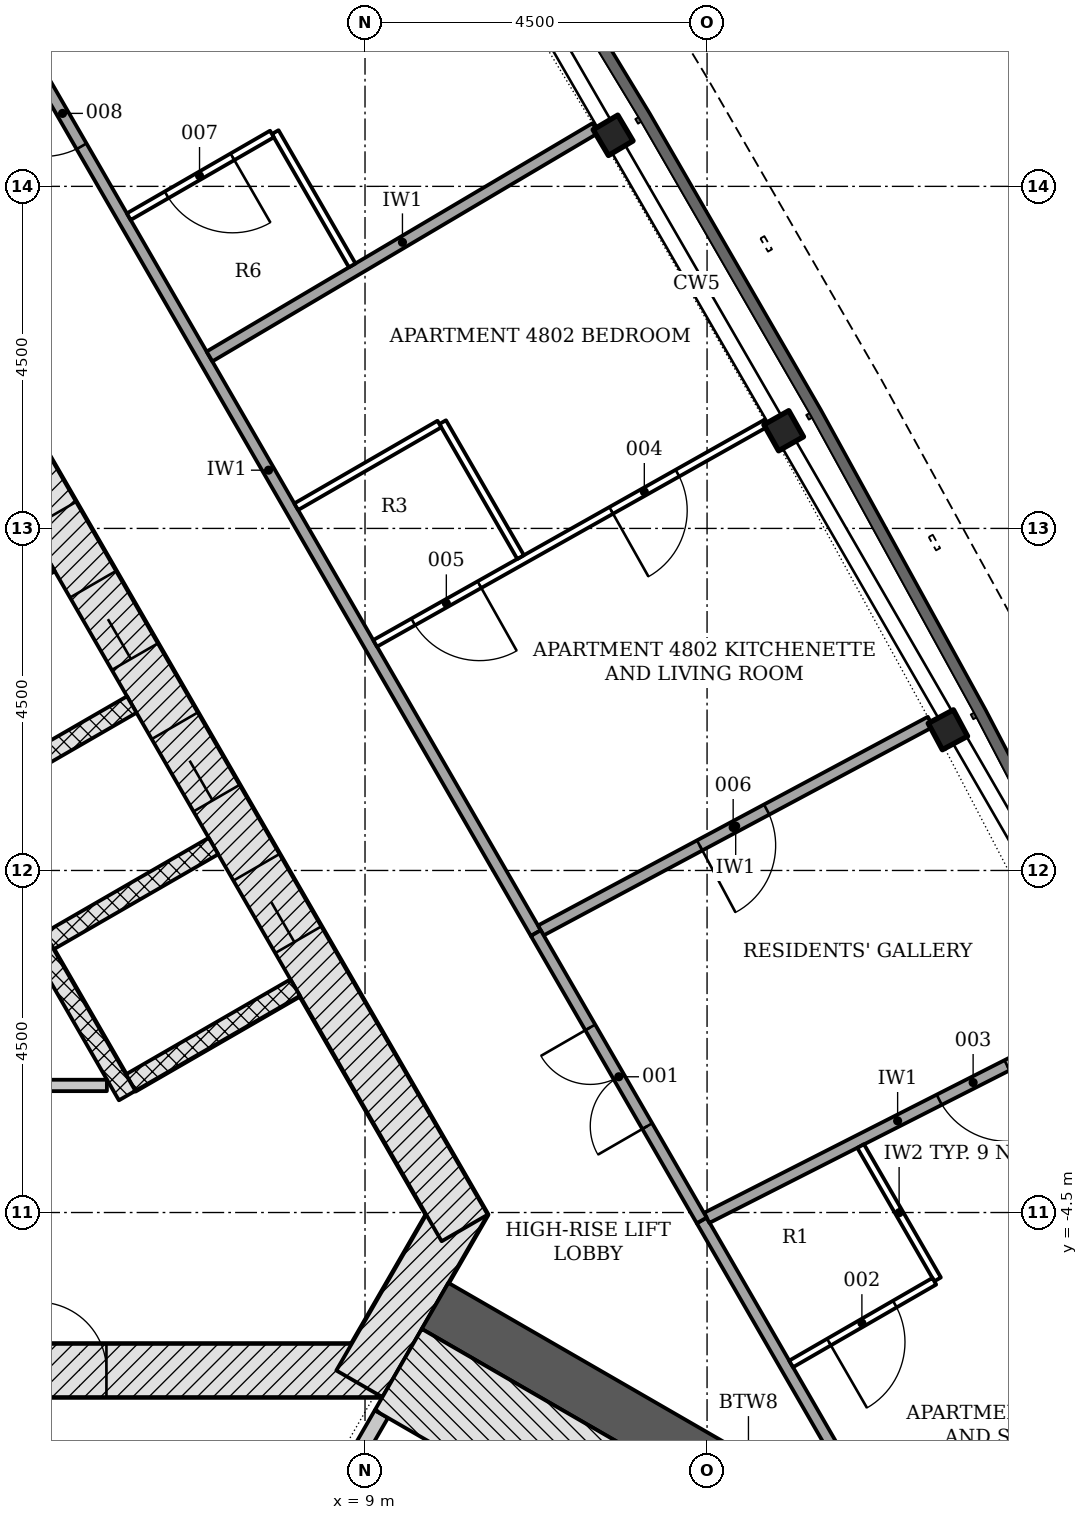
"""IFC4 building model, lengths in metres.
Left out: names, types, materials, properties, quantities, classifications, styles, units other than length and angle.
Written with IfcOpenShell. Run it as: python <this file> out.ifc"""

import sys

from ifc_helpers import new_model, si_unit, direction, frame, frame_2d, origin, origin_2d, place, context, subcontext, project, spatial, polyline, rectangle, i_section, outline, extrude, element, fill, save


model = new_model("IFC4")
c1 = context("Model", 3, precision=1e-05, world=origin(), true_north=direction((0.0, 1.0)))
c2 = subcontext(c1, "Body", "Model", "MODEL_VIEW")
j1 = project(units=[si_unit("LENGTHUNIT", "METRE"), si_unit("PLANEANGLEUNIT", "RADIAN")], contexts=[c1])
p1 = place(None, origin())
s1 = spatial("IfcSite", under=j1, at=p1, CompositionType="ELEMENT")
p2 = place(p1, origin())
s2 = spatial("IfcBuilding", under=s1, at=p2, CompositionType="ELEMENT")
p3 = place(p2, frame((0.0, 0.0, 188.7)))
s3 = spatial("IfcBuildingStorey", under=s2, at=p3, CompositionType="ELEMENT", Elevation=188.7)
p4 = place(p3, frame((-9.229, -6.578, -0.2), z_axis=(0.0, 0.0, 1.0), x_axis=(1.0, 0.0, 0.0)))
e1 = element("IfcWall", 1, at=p4, inside=s3, PredefinedType="SHEAR", context=c2, shape_type="SweptSolid", body=[
    extrude(rectangle(XDim=18.458, YDim=0.7, at=frame_2d((9.229, 0.0))), origin(), (0.0, 0.0, 1.0), 3.6),
])
p5 = place(p4, frame((9.5, 0.0, 0.2)))
e2 = element("IfcOpeningElement", 2, at=p5, cuts=e1, PredefinedType="OPENING", context=c2, shape_type="SweptSolid", body=[
    extrude(rectangle(XDim=1.0, YDim=2.1, at=frame_2d((0.5, 1.05))), frame((0.0, 0.36, 0.0), z_axis=(0.0, -1.0, 0.0), x_axis=(1.0, 0.0, 0.0)), (0.0, 0.0, 1.0), 0.72),
])
p6 = place(p4, frame((4.402, 0.0, 0.2)))
e3 = element("IfcOpeningElement", 3, at=p6, cuts=e1, PredefinedType="OPENING", context=c2, shape_type="SweptSolid", body=[
    extrude(rectangle(XDim=0.9, YDim=2.1, at=frame_2d((0.45, 1.05))), frame((0.0, 0.36, 0.0), z_axis=(0.0, -1.0, 0.0), x_axis=(1.0, 0.0, 0.0)), (0.0, 0.0, 1.0), 0.72),
])
p7 = place(p4, frame((13.927, 0.0, 0.2)))
e4 = element("IfcOpeningElement", 4, at=p7, cuts=e1, PredefinedType="OPENING", context=c2, shape_type="SweptSolid", body=[
    extrude(rectangle(XDim=0.9, YDim=2.1, at=frame_2d((0.45, 1.05))), frame((0.0, 0.36, 0.0), z_axis=(0.0, -1.0, 0.0), x_axis=(1.0, 0.0, 0.0)), (0.0, 0.0, 1.0), 0.72),
])
p8 = place(p3, frame((8.926, -6.753, -0.2), z_axis=(0.0, 0.0, 1.0), x_axis=(0.500042739161, 0.866000726912, 0.0)))
e5 = element("IfcWall", 5, at=p8, inside=s3, PredefinedType="SHEAR", context=c2, shape_type="SweptSolid", body=[
    extrude(rectangle(XDim=2.771, YDim=0.7, at=frame_2d((1.386, 0.0))), origin(), (0.0, 0.0, 1.0), 3.6),
])
p9 = place(p3, frame((10.311, -4.703, -0.2), z_axis=(0.0, 0.0, 1.0), x_axis=(-0.500001446645, 0.866024568562, 0.0)))
e6 = element("IfcWall", 6, at=p9, inside=s3, PredefinedType="SHEAR", context=c2, shape_type="SweptSolid", body=[
    extrude(rectangle(XDim=18.458, YDim=0.7, at=frame_2d((9.229, 0.0))), origin(), (0.0, 0.0, 1.0), 3.6),
])
p10 = place(p9, frame((4.379, 0.0, 0.2)))
e7 = element("IfcOpeningElement", 7, at=p10, cuts=e6, PredefinedType="OPENING", context=c2, shape_type="SweptSolid", body=[
    extrude(rectangle(XDim=1.1, YDim=2.1, at=frame_2d((0.55, 1.05))), frame((0.0, 0.36, 0.0), z_axis=(0.0, -1.0, 0.0), x_axis=(1.0, 0.0, 0.0)), (0.0, 0.0, 1.0), 0.72),
])
p11 = place(p9, frame((6.529, 0.0, 0.2)))
e8 = element("IfcOpeningElement", 8, at=p11, cuts=e6, PredefinedType="OPENING", context=c2, shape_type="SweptSolid", body=[
    extrude(rectangle(XDim=1.1, YDim=2.1, at=frame_2d((0.55, 1.05))), frame((0.0, 0.36, 0.0), z_axis=(0.0, -1.0, 0.0), x_axis=(1.0, 0.0, 0.0)), (0.0, 0.0, 1.0), 0.72),
])
p12 = place(p9, frame((8.679, 0.0, 0.2)))
e9 = element("IfcOpeningElement", 9, at=p12, cuts=e6, PredefinedType="OPENING", context=c2, shape_type="SweptSolid", body=[
    extrude(rectangle(XDim=1.1, YDim=2.1, at=frame_2d((0.55, 1.05))), frame((0.0, 0.36, 0.0), z_axis=(0.0, -1.0, 0.0), x_axis=(1.0, 0.0, 0.0)), (0.0, 0.0, 1.0), 0.72),
])
p13 = place(p9, frame((10.829, 0.0, 0.2)))
e10 = element("IfcOpeningElement", 10, at=p13, cuts=e6, PredefinedType="OPENING", context=c2, shape_type="SweptSolid", body=[
    extrude(rectangle(XDim=1.1, YDim=2.1, at=frame_2d((0.55, 1.05))), frame((0.0, 0.36, 0.0), z_axis=(0.0, -1.0, 0.0), x_axis=(1.0, 0.0, 0.0)), (0.0, 0.0, 1.0), 0.72),
])
p14 = place(p9, frame((12.979, 0.0, 0.2)))
e11 = element("IfcOpeningElement", 11, at=p14, cuts=e6, PredefinedType="OPENING", context=c2, shape_type="SweptSolid", body=[
    extrude(rectangle(XDim=1.1, YDim=2.1, at=frame_2d((0.55, 1.05))), frame((0.0, 0.36, 0.0), z_axis=(0.0, -1.0, 0.0), x_axis=(1.0, 0.0, 0.0)), (0.0, 0.0, 1.0), 0.72),
])
p15 = place(p3, frame((9.922, -5.728, -0.2), z_axis=(0.0, 0.0, 1.0), x_axis=(0.866025463095, -0.499999897272, 0.0)))
e12 = element("IfcWall", 12, at=p15, inside=s3, PredefinedType="SHEAR", context=c2, shape_type="SweptSolid", body=[
    extrude(rectangle(XDim=9.521, YDim=0.7, at=frame_2d((4.761, 0.0))), origin(), (0.0, 0.0, 1.0), 3.6),
])
for number, where, z_axis, x_axis in (
    (13, (16.668, 1.851, -0.2), (0.0, 0.0, 1.0), (-0.472, 0.882, 0.0)),
    (14, (14.508, 5.785, -0.2), (0.0, 0.0, 1.0), (-0.491, 0.871, 0.0)),
    (15, (12.264, 9.672, -0.2), (0.0, 0.0, 1.0), (-0.509, 0.861, 0.0)),
):
    element("IfcColumn", number, at=place(p3, frame(where, z_axis=z_axis, x_axis=x_axis)), inside=s3, PredefinedType="COLUMN", context=c2, shape_type="SweptSolid", body=[
        extrude(i_section(OverallWidth=0.394, OverallDepth=0.376, WebThickness=0.017, FlangeThickness=0.028, FilletRadius=0.015, at=origin_2d()), origin(), (0.0, 0.0, 1.0), 3.6),
    ])
p16 = place(p3, origin())
e16 = element("IfcWall", 16, at=p16, inside=s3, PredefinedType="NOTDEFINED", context=c2, shape_type="SweptSolid", body=[
    extrude(outline(polyline([(15.735, -15.429), (17.205, -15.313), (18.726, -14.974), (20.096, -14.233), (21.213, -13.147), (21.992, -11.798), (22.374, -10.287), (22.33, -8.73), (21.865, -7.243), (21.229, -5.913), (20.959, -6.042), (21.584, -7.353), (22.032, -8.78), (22.073, -10.254), (21.711, -11.684), (20.974, -12.961), (19.917, -13.989), (18.619, -14.69), (17.16, -15.016), (15.712, -15.13), (15.735, -15.429)])), origin(), (0.0, 0.0, 1.0), 3.3),
])
for number, where, z_axis, x_axis in (
    (17, (8.081, -1.541, -0.2), (0.0, 0.0, 1.0), (-0.866, -0.5, 0.0)),
    (18, (7.006, 0.321, -0.2), (0.0, 0.0, 1.0), (-0.866, -0.5, 0.0)),
):
    element("IfcWall", number, at=place(p3, frame(where, z_axis=z_axis, x_axis=x_axis)), inside=s3, PredefinedType="PARTITIONING", context=c2, shape_type="SweptSolid", body=[
        extrude(rectangle(XDim=2.5, YDim=0.25, at=frame_2d((1.25, 0.0))), origin(), (0.0, 0.0, 1.0), 3.6),
    ])
p17 = place(p3, frame((5.931, 2.183, -0.2), z_axis=(0.0, 0.0, 1.0), x_axis=(-0.866047370643, -0.499961950354, 0.0)))
e19 = element("IfcWall", 19, at=p17, inside=s3, PredefinedType="PARTITIONING", context=c2, shape_type="SweptSolid", body=[
    extrude(rectangle(XDim=2.5, YDim=0.25, at=frame_2d((1.25, 0.0))), origin(), (0.0, 0.0, 1.0), 3.6),
])
p18 = place(p3, frame((4.856, 4.045, -0.2), z_axis=(0.0, 0.0, 1.0), x_axis=(-0.866022959057, -0.500004234368, 0.0)))
e20 = element("IfcWall", 20, at=p18, inside=s3, PredefinedType="PARTITIONING", context=c2, shape_type="SweptSolid", body=[
    extrude(rectangle(XDim=2.5, YDim=0.25, at=frame_2d((1.25, 0.0))), origin(), (0.0, 0.0, 1.0), 3.6),
])
p19 = place(p3, frame((5.87, -2.961, 0.0), z_axis=(0.0, 0.0, 1.0), x_axis=(-0.50000615651, 0.866021849293, 0.0)))
e21 = element("IfcWall", 21, at=p19, inside=s3, PredefinedType="PARTITIONING", context=c2, shape_type="SweptSolid", body=[
    extrude(rectangle(XDim=11.0, YDim=0.25, at=frame_2d((5.5, 0.0))), origin(), (0.0, 0.0, 1.0), 3.4),
])
p20 = place(p3, frame((1.846, -2.828, 0.0), z_axis=(0.0, 0.0, 1.0), x_axis=(1.0, 0.0, 0.0)))
e22 = element("IfcWall", 22, at=p20, inside=s3, PredefinedType="PARTITIONING", context=c2, shape_type="SweptSolid", body=[
    extrude(rectangle(XDim=3.758, YDim=0.15, at=frame_2d((1.879, 0.0))), origin(), (0.0, 0.0, 1.0), 3.4),
])
p21 = place(p3, frame((7.44, -10.226, -0.2), z_axis=(0.0, 0.0, 1.0), x_axis=(0.500022077904, 0.866012656725, 0.0)))
e23 = element("IfcWall", 23, at=p21, inside=s3, PredefinedType="SHEAR", context=c2, shape_type="SweptSolid", body=[
    extrude(rectangle(XDim=3.55, YDim=0.2, at=frame_2d((1.775, 0.0))), origin(), (0.0, 0.0, 1.0), 3.6),
])
p22 = place(p21, frame((1.175, 0.0, 0.2)))
e24 = element("IfcOpeningElement", 24, at=p22, cuts=e23, PredefinedType="OPENING", context=c2, shape_type="SweptSolid", body=[
    extrude(rectangle(XDim=1.2, YDim=2.1, at=frame_2d((0.6, 1.05))), frame((0.0, 0.11, 0.0), z_axis=(0.0, -1.0, 0.0), x_axis=(1.0, 0.0, 0.0)), (0.0, 0.0, 1.0), 0.22),
])
p23 = place(p3, frame((9.438, -6.566, -0.2), z_axis=(0.0, 0.0, 1.0), x_axis=(0.866026919366, -0.499997374926, 0.0)))
e25 = element("IfcWall", 25, at=p23, inside=s3, PredefinedType="SHEAR", context=c2, shape_type="SweptSolid", body=[
    extrude(rectangle(XDim=7.2, YDim=1.236, at=frame_2d((3.6, 0.0))), origin(), (0.0, 0.0, 1.0), 3.6),
])
p24 = place(p3, frame((15.807, -8.722, 0.0), z_axis=(0.0, 0.0, 1.0), x_axis=(-0.500015802937, 0.866016279763, 0.0)))
e26 = element("IfcWall", 26, at=p24, inside=s3, PredefinedType="PARTITIONING", context=c2, shape_type="SweptSolid", body=[
    extrude(rectangle(XDim=4.755, YDim=0.15, at=frame_2d((2.377, 0.0))), origin(), (0.0, 0.0, 1.0), 2.923),
])
p25 = place(p3, frame((11.247, -0.824, 0.0), z_axis=(0.0, 0.0, 1.0), x_axis=(-0.499997921847, 0.866026603603, 0.0)))
e27 = element("IfcWall", 27, at=p25, inside=s3, PredefinedType="PARTITIONING", context=c2, shape_type="SweptSolid", body=[
    extrude(rectangle(XDim=14.065, YDim=0.15, at=frame_2d((7.032, 0.0))), origin(), (0.0, 0.0, 1.0), 2.852),
])
p26 = place(p25, frame((11.953, 0.0, 0.0)))
e28 = element("IfcOpeningElement", 28, at=p26, cuts=e27, PredefinedType="OPENING", context=c2, shape_type="SweptSolid", body=[
    extrude(rectangle(XDim=1.0, YDim=2.1, at=frame_2d((0.5, 1.05))), frame((0.0, 0.085, 0.0), z_axis=(0.0, -1.0, 0.0), x_axis=(1.0, 0.0, 0.0)), (0.0, 0.0, 1.0), 0.17),
])
p27 = place(p3, frame((18.518, -2.019, 0.0), z_axis=(0.0, 0.0, 1.0), x_axis=(-0.891548029597, -0.452926164978, 0.0)))
e29 = element("IfcWall", 29, at=p27, inside=s3, PredefinedType="PARTITIONING", context=c2, shape_type="SweptSolid", body=[
    extrude(rectangle(XDim=5.632, YDim=0.15, at=frame_2d((2.816, 0.0))), origin(), (0.0, 0.0, 1.0), 2.461),
])
p28 = place(p27, frame((1.202, 0.0, 0.0)))
e30 = element("IfcOpeningElement", 30, at=p28, cuts=e29, PredefinedType="OPENING", context=c2, shape_type="SweptSolid", body=[
    extrude(rectangle(XDim=1.0, YDim=2.1, at=frame_2d((0.5, 1.05))), frame((0.0, 0.085, 0.0), z_axis=(0.0, -1.0, 0.0), x_axis=(1.0, 0.0, 0.0)), (0.0, 0.0, 1.0), 0.17),
])
p29 = place(p3, frame((16.44, 1.956, 0.0), z_axis=(0.0, 0.0, 1.0), x_axis=(-0.881627849584, -0.471945266783, 0.0)))
e31 = element("IfcWall", 31, at=p29, inside=s3, PredefinedType="PARTITIONING", context=c2, shape_type="SweptSolid", body=[
    extrude(rectangle(XDim=5.815, YDim=0.15, at=frame_2d((2.907, 0.0))), origin(), (0.0, 0.0, 1.0), 2.461),
])
p30 = place(p29, frame((2.445, 0.0, 0.0)))
e32 = element("IfcOpeningElement", 32, at=p30, cuts=e31, PredefinedType="OPENING", context=c2, shape_type="SweptSolid", body=[
    extrude(rectangle(XDim=1.0, YDim=2.1, at=frame_2d((0.5, 1.05))), frame((0.0, 0.085, 0.0), z_axis=(0.0, -1.0, 0.0), x_axis=(1.0, 0.0, 0.0)), (0.0, 0.0, 1.0), 0.17),
])
p31 = place(p3, frame((13.429, -4.604, 0.0), z_axis=(0.0, 0.0, 1.0), x_axis=(-0.499995208485, 0.866028170149, 0.0)))
e33 = element("IfcWall", 33, at=p31, inside=s3, PredefinedType="PARTITIONING", context=c2, shape_type="SweptSolid", body=[
    extrude(rectangle(XDim=4.365, YDim=0.15, at=frame_2d((2.182, 0.0))), origin(), (0.0, 0.0, 1.0), 2.852),
])
p32 = place(p31, frame((1.432, 0.0, 0.0)))
e34 = element("IfcOpeningElement", 34, at=p32, cuts=e33, PredefinedType="OPENING", context=c2, shape_type="SweptSolid", body=[
    extrude(rectangle(XDim=1.5, YDim=2.1, at=frame_2d((0.75, 1.05))), frame((0.0, 0.085, 0.0), z_axis=(0.0, -1.0, 0.0), x_axis=(1.0, 0.0, 0.0)), (0.0, 0.0, 1.0), 0.17),
])
p33 = place(p3, frame((15.521, -3.626, 0.0), z_axis=(0.0, 0.0, 1.0), x_axis=(0.500042536776, -0.866000843773, 0.0)))
e35 = element("IfcWall", 35, at=p33, inside=s3, PredefinedType="PARTITIONING", context=c2, shape_type="SweptSolid", body=[
    extrude(rectangle(XDim=2.025, YDim=0.1, at=frame_2d((1.012, 0.0))), origin(), (0.0, 0.0, 1.0), 3.4),
])
p34 = place(p3, frame((16.49, -5.405, 0.0), z_axis=(0.0, 0.0, 1.0), x_axis=(-0.866065968399, -0.499929733443, 0.0)))
e36 = element("IfcWall", 36, at=p34, inside=s3, PredefinedType="PARTITIONING", context=c2, shape_type="SweptSolid", body=[
    extrude(rectangle(XDim=2.175, YDim=0.1, at=frame_2d((1.087, 0.0))), origin(), (0.0, 0.0, 1.0), 3.4),
])
p35 = place(p34, frame((0.6, 0.0, 0.0)))
e37 = element("IfcOpeningElement", 37, at=p35, cuts=e36, PredefinedType="OPENING", context=c2, shape_type="SweptSolid", body=[
    extrude(rectangle(XDim=1.0, YDim=2.1, at=frame_2d((0.5, 1.05))), frame((0.0, 0.06, 0.0), z_axis=(0.0, -1.0, 0.0), x_axis=(1.0, 0.0, 0.0)), (0.0, 0.0, 1.0), 0.12),
])
p36 = place(p3, frame((14.277, 5.885, 0.0), z_axis=(0.0, 0.0, 1.0), x_axis=(-0.871335785584, -0.490687220907, 0.0)))
e38 = element("IfcWall", 38, at=p36, inside=s3, PredefinedType="PARTITIONING", context=c2, shape_type="SweptSolid", body=[
    extrude(rectangle(XDim=5.904, YDim=0.1, at=frame_2d((2.952, 0.0))), origin(), (0.0, 0.0, 1.0), 2.461),
])
p37 = place(p36, frame((1.339, 0.0, 0.0)))
e39 = element("IfcOpeningElement", 39, at=p37, cuts=e38, PredefinedType="OPENING", context=c2, shape_type="SweptSolid", body=[
    extrude(rectangle(XDim=1.0, YDim=2.1, at=frame_2d((0.5, 1.05))), frame((0.0, 0.06, 0.0), z_axis=(0.0, -1.0, 0.0), x_axis=(1.0, 0.0, 0.0)), (0.0, 0.0, 1.0), 0.12),
])
p38 = place(p36, frame((4.329, 0.0, 0.0)))
e40 = element("IfcOpeningElement", 40, at=p38, cuts=e38, PredefinedType="OPENING", context=c2, shape_type="SweptSolid", body=[
    extrude(rectangle(XDim=1.0, YDim=2.1, at=frame_2d((0.5, 1.05))), frame((0.0, 0.06, 0.0), z_axis=(0.0, -1.0, 0.0), x_axis=(1.0, 0.0, 0.0)), (0.0, 0.0, 1.0), 0.12),
])
p39 = place(p3, frame((11.047, 4.123, 0.0), z_axis=(0.0, 0.0, 1.0), x_axis=(-0.500007699544, 0.866020958405, 0.0)))
e41 = element("IfcWall", 41, at=p39, inside=s3, PredefinedType="PARTITIONING", context=c2, shape_type="SweptSolid", body=[
    extrude(rectangle(XDim=2.05, YDim=0.1, at=frame_2d((1.025, 0.0))), origin(), (0.0, 0.0, 1.0), 2.852),
])
p40 = place(p3, frame((9.979, 5.873, 0.0), z_axis=(0.0, 0.0, 1.0), x_axis=(-0.866037911478, -0.499978335414, 0.0)))
e42 = element("IfcWall", 42, at=p40, inside=s3, PredefinedType="PARTITIONING", context=c2, shape_type="SweptSolid", body=[
    extrude(rectangle(XDim=2.175, YDim=0.1, at=frame_2d((1.087, 0.0))), origin(), (0.0, 0.0, 1.0), 2.852),
])
p41 = place(p3, frame((12.031, 9.766, 0.0), z_axis=(0.0, 0.0, 1.0), x_axis=(-0.860638865546, -0.509215811922, 0.0)))
e43 = element("IfcWall", 43, at=p41, inside=s3, PredefinedType="PARTITIONING", context=c2, shape_type="SweptSolid", body=[
    extrude(rectangle(XDim=5.9, YDim=0.15, at=frame_2d((2.95, 0.0))), origin(), (0.0, 0.0, 1.0), 2.461),
])
p42 = place(p3, frame((8.831, 7.96, 0.0), z_axis=(0.0, 0.0, 1.0), x_axis=(-0.499990325971, 0.866030989016, 0.0)))
e44 = element("IfcWall", 44, at=p42, inside=s3, PredefinedType="PARTITIONING", context=c2, shape_type="SweptSolid", body=[
    extrude(rectangle(XDim=2.025, YDim=0.1, at=frame_2d((1.012, 0.0))), origin(), (0.0, 0.0, 1.0), 2.852),
])
p43 = place(p3, frame((7.775, 9.689, 0.0), z_axis=(0.0, 0.0, 1.0), x_axis=(-0.865989304205, -0.500062521093, 0.0)))
e45 = element("IfcWall", 45, at=p43, inside=s3, PredefinedType="PARTITIONING", context=c2, shape_type="SweptSolid", body=[
    extrude(rectangle(XDim=2.175, YDim=0.1, at=frame_2d((1.087, 0.0))), origin(), (0.0, 0.0, 1.0), 2.852),
])
p44 = place(p43, frame((0.6, 0.0, 0.0)))
e46 = element("IfcOpeningElement", 46, at=p44, cuts=e45, PredefinedType="OPENING", context=c2, shape_type="SweptSolid", body=[
    extrude(rectangle(XDim=1.0, YDim=2.1, at=frame_2d((0.5, 1.05))), frame((0.0, 0.06, 0.0), z_axis=(0.0, -1.0, 0.0), x_axis=(1.0, 0.0, 0.0)), (0.0, 0.0, 1.0), 0.12),
])
p45 = place(p10, origin())
e47 = element("IfcDoor", 47, at=p45, inside=s3, OperationType="DOUBLE_DOOR_SLIDING", PredefinedType="DOOR", context=c2, shape_type="SweptSolid", body=[
    extrude(rectangle(XDim=1.1, YDim=2.1, at=frame_2d((0.55, 1.05))), frame((0.0, 0.025, 0.0), z_axis=(0.0, -1.0, 0.0), x_axis=(1.0, 0.0, 0.0)), (0.0, 0.0, 1.0), 0.05),
])
fill(e7, e47)
p46 = place(p11, origin())
e48 = element("IfcDoor", 48, at=p46, inside=s3, OperationType="DOUBLE_DOOR_SLIDING", PredefinedType="DOOR", context=c2, shape_type="SweptSolid", body=[
    extrude(rectangle(XDim=1.1, YDim=2.1, at=frame_2d((0.55, 1.05))), frame((0.0, 0.025, 0.0), z_axis=(0.0, -1.0, 0.0), x_axis=(1.0, 0.0, 0.0)), (0.0, 0.0, 1.0), 0.05),
])
fill(e8, e48)
p47 = place(p12, origin())
e49 = element("IfcDoor", 49, at=p47, inside=s3, OperationType="DOUBLE_DOOR_SLIDING", PredefinedType="DOOR", context=c2, shape_type="SweptSolid", body=[
    extrude(rectangle(XDim=1.1, YDim=2.1, at=frame_2d((0.55, 1.05))), frame((0.0, 0.025, 0.0), z_axis=(0.0, -1.0, 0.0), x_axis=(1.0, 0.0, 0.0)), (0.0, 0.0, 1.0), 0.05),
])
fill(e9, e49)
p48 = place(p13, origin())
e50 = element("IfcDoor", 50, at=p48, inside=s3, OperationType="DOUBLE_DOOR_SLIDING", PredefinedType="DOOR", context=c2, shape_type="SweptSolid", body=[
    extrude(rectangle(XDim=1.1, YDim=2.1, at=frame_2d((0.55, 1.05))), frame((0.0, 0.025, 0.0), z_axis=(0.0, -1.0, 0.0), x_axis=(1.0, 0.0, 0.0)), (0.0, 0.0, 1.0), 0.05),
])
fill(e10, e50)
p49 = place(p7, origin())
e51 = element("IfcDoor", 51, at=p49, inside=s3, OperationType="SINGLE_SWING_LEFT", PredefinedType="DOOR", context=c2, shape_type="SweptSolid", body=[
    extrude(rectangle(XDim=0.9, YDim=2.1, at=frame_2d((0.45, 1.05))), frame((0.0, 0.075, 0.0), z_axis=(0.0, -1.0, 0.0), x_axis=(1.0, 0.0, 0.0)), (0.0, 0.0, 1.0), 0.15),
])
fill(e4, e51)
p50 = place(p32, origin())
e52 = element("IfcDoor", 52, at=p50, inside=s3, OperationType="DOUBLE_DOOR_SINGLE_SWING", PredefinedType="DOOR", context=c2, shape_type="SweptSolid", body=[
    extrude(rectangle(XDim=1.5, YDim=2.1, at=frame_2d((0.75, 1.05))), frame((0.0, 0.025, 0.0), z_axis=(0.0, -1.0, 0.0), x_axis=(1.0, 0.0, 0.0)), (0.0, 0.0, 1.0), 0.05),
])
fill(e34, e52)
p51 = place(p35, origin())
e53 = element("IfcDoor", 53, at=p51, inside=s3, OperationType="SINGLE_SWING_RIGHT", PredefinedType="DOOR", context=c2, shape_type="SweptSolid", body=[
    extrude(rectangle(XDim=1.0, YDim=2.1, at=frame_2d((0.5, 1.05))), frame((0.0, 0.025, 0.0), z_axis=(0.0, -1.0, 0.0), x_axis=(1.0, 0.0, 0.0)), (0.0, 0.0, 1.0), 0.05),
])
fill(e37, e53)
p52 = place(p28, origin())
e54 = element("IfcDoor", 54, at=p52, inside=s3, OperationType="SINGLE_SWING_LEFT", PredefinedType="DOOR", context=c2, shape_type="SweptSolid", body=[
    extrude(rectangle(XDim=1.0, YDim=2.1, at=frame_2d((0.5, 1.05))), frame((0.0, 0.025, 0.0), z_axis=(0.0, -1.0, 0.0), x_axis=(1.0, 0.0, 0.0)), (0.0, 0.0, 1.0), 0.05),
])
fill(e30, e54)
p53 = place(p37, origin())
e55 = element("IfcDoor", 55, at=p53, inside=s3, OperationType="SINGLE_SWING_RIGHT", PredefinedType="DOOR", context=c2, shape_type="SweptSolid", body=[
    extrude(rectangle(XDim=1.0, YDim=2.1, at=frame_2d((0.5, 1.05))), frame((0.0, 0.025, 0.0), z_axis=(0.0, -1.0, 0.0), x_axis=(1.0, 0.0, 0.0)), (0.0, 0.0, 1.0), 0.05),
])
fill(e39, e55)
p54 = place(p38, origin())
e56 = element("IfcDoor", 56, at=p54, inside=s3, OperationType="SINGLE_SWING_LEFT", PredefinedType="DOOR", context=c2, shape_type="SweptSolid", body=[
    extrude(rectangle(XDim=1.0, YDim=2.1, at=frame_2d((0.5, 1.05))), frame((0.0, 0.025, 0.0), z_axis=(0.0, -1.0, 0.0), x_axis=(1.0, 0.0, 0.0)), (0.0, 0.0, 1.0), 0.05),
])
fill(e40, e56)
p55 = place(p30, origin())
e57 = element("IfcDoor", 57, at=p55, inside=s3, OperationType="SINGLE_SWING_RIGHT", PredefinedType="DOOR", context=c2, shape_type="SweptSolid", body=[
    extrude(rectangle(XDim=1.0, YDim=2.1, at=frame_2d((0.5, 1.05))), frame((0.0, 0.025, 0.0), z_axis=(0.0, -1.0, 0.0), x_axis=(1.0, 0.0, 0.0)), (0.0, 0.0, 1.0), 0.05),
])
fill(e32, e57)
p56 = place(p44, origin())
e58 = element("IfcDoor", 58, at=p56, inside=s3, OperationType="SINGLE_SWING_LEFT", PredefinedType="DOOR", context=c2, shape_type="SweptSolid", body=[
    extrude(rectangle(XDim=1.0, YDim=2.1, at=frame_2d((0.5, 1.05))), frame((0.0, 0.025, 0.0), z_axis=(0.0, -1.0, 0.0), x_axis=(1.0, 0.0, 0.0)), (0.0, 0.0, 1.0), 0.05),
])
fill(e46, e58)
p57 = place(p26, origin())
e59 = element("IfcDoor", 59, at=p57, inside=s3, OperationType="SINGLE_SWING_RIGHT", PredefinedType="DOOR", context=c2, shape_type="SweptSolid", body=[
    extrude(rectangle(XDim=1.0, YDim=2.1, at=frame_2d((0.5, 1.05))), frame((0.0, 0.025, 0.0), z_axis=(0.0, -1.0, 0.0), x_axis=(1.0, 0.0, 0.0)), (0.0, 0.0, 1.0), 0.05),
])
fill(e28, e59)
save(model, sys.argv[1])
